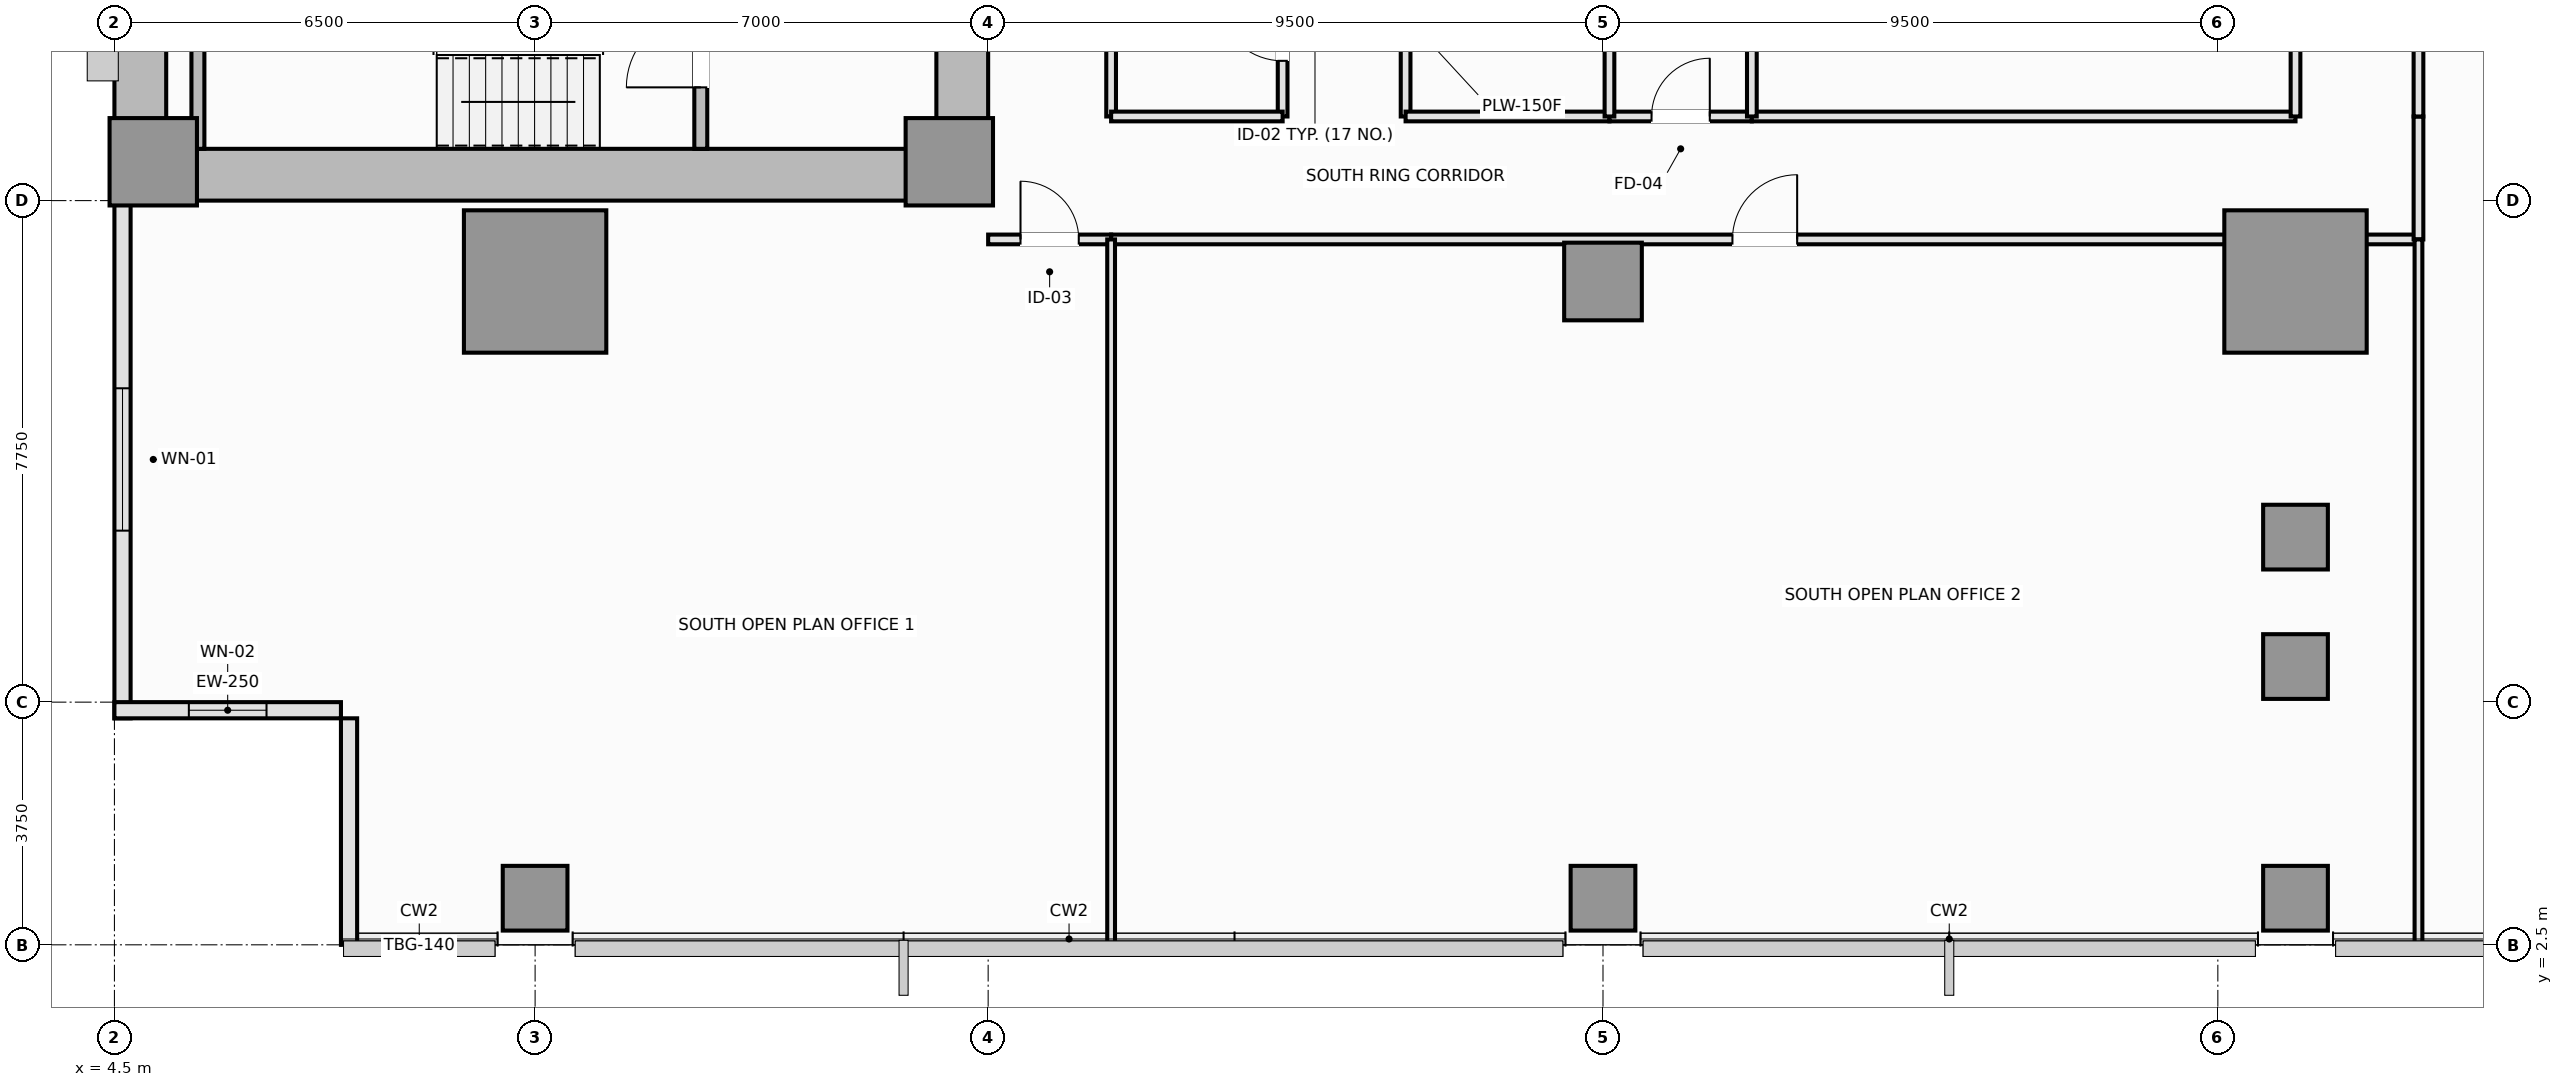
"""IFC4 building model, lengths in metres.
Left out: names, types, materials, properties, quantities, classifications, styles, units other than length and angle.
Written with IfcOpenShell. Run it as: python <this file> out.ifc"""

import sys

from ifc_helpers import new_model, si_unit, direction, frame, frame_2d, origin, origin_2d, place, context, subcontext, project, spatial, rectangle, extrude, element, fill, save


model = new_model("IFC4")
c1 = context("Model", 3, precision=1e-05, world=origin(), true_north=direction((0.0, 1.0)))
c2 = subcontext(c1, "Body", "Model", "MODEL_VIEW")
j1 = project(units=[si_unit("LENGTHUNIT", "METRE"), si_unit("PLANEANGLEUNIT", "RADIAN")], contexts=[c1])
p1 = place(None, origin())
s1 = spatial("IfcSite", under=j1, at=p1, CompositionType="ELEMENT")
p2 = place(p1, origin())
s2 = spatial("IfcBuilding", under=s1, at=p2, CompositionType="ELEMENT")
p3 = place(p2, frame((0.0, 0.0, 46.9)))
s3 = spatial("IfcBuildingStorey", under=s2, at=p3, CompositionType="ELEMENT", Elevation=46.9)
p4 = place(p3, frame((4.5, 14.4, 0.0), z_axis=(0.0, 0.0, 1.0), x_axis=(1.0, 0.0, 0.0)))
e1 = element("IfcWall", 1, at=p4, inside=s3, PredefinedType="SHEAR", context=c2, shape_type="SweptSolid", body=[
    extrude(rectangle(XDim=13.5, YDim=0.8, at=frame_2d((6.75, 0.0))), origin(), (0.0, 0.0, 1.0), 3.55),
])
p5 = place(p3, frame((4.9, 14.8, 0.0), z_axis=(0.0, 0.0, 1.0), x_axis=(0.0, 1.0, 0.0)))
e2 = element("IfcWall", 2, at=p5, inside=s3, PredefinedType="SHEAR", context=c2, shape_type="SweptSolid", body=[
    extrude(rectangle(XDim=20.9, YDim=0.8, at=frame_2d((10.45, 0.0))), origin(), (0.0, 0.0, 1.0), 3.55),
])
p6 = place(p3, frame((17.6, 14.8, 0.0), z_axis=(0.0, 0.0, 1.0), x_axis=(0.0, 1.0, 0.0)))
e3 = element("IfcWall", 3, at=p6, inside=s3, PredefinedType="SHEAR", context=c2, shape_type="SweptSolid", body=[
    extrude(rectangle(XDim=8.65, YDim=0.8, at=frame_2d((4.325, 0.0))), origin(), (0.0, 0.0, 1.0), 3.55),
])
p7 = place(p6, frame((4.1, 0.0, 0.0)))
e4 = element("IfcOpeningElement", 4, at=p7, cuts=e3, PredefinedType="OPENING", context=c2, shape_type="SweptSolid", body=[
    extrude(rectangle(XDim=1.1, YDim=2.15, at=frame_2d((0.55, 1.075))), frame((0.0, 0.41, 0.0), z_axis=(0.0, -1.0, 0.0), x_axis=(1.0, 0.0, 0.0)), (0.0, 0.0, 1.0), 0.82),
])
for number, where, z_axis, x_axis in (
    (5, (5.1, 14.6, 0.0), (0.0, 0.0, 1.0), (1.0, 0.0, 0.0)),
    (6, (17.4, 14.6, 0.0), (0.0, 0.0, 1.0), (1.0, 0.0, 0.0)),
):
    element("IfcColumn", number, at=place(p3, frame(where, z_axis=z_axis, x_axis=x_axis)), inside=s3, PredefinedType="PILASTER", context=c2, shape_type="SweptSolid", body=[
        extrude(rectangle(XDim=1.35, YDim=1.35, at=origin_2d()), origin(), (0.0, 0.0, 1.0), 3.55),
    ])
for number, where, z_axis, x_axis in (
    (7, (11.0, 12.75, 0.0), (0.0, 0.0, 1.0), (1.0, 0.0, 0.0)),
    (8, (38.2, 12.75, 0.0), (0.0, 0.0, 1.0), (1.0, 0.0, 0.0)),
):
    element("IfcColumn", number, at=place(p3, frame(where, z_axis=z_axis, x_axis=x_axis)), inside=s3, PredefinedType="COLUMN", context=c2, shape_type="SweptSolid", body=[
        extrude(rectangle(XDim=2.2, YDim=2.2, at=origin_2d()), origin(), (0.0, 0.0, 1.0), 3.55),
    ])
p8 = place(p3, frame((27.5, 12.75, 0.0), z_axis=(0.0, 0.0, 1.0), x_axis=(1.0, 0.0, 0.0)))
e9 = element("IfcColumn", 9, at=p8, inside=s3, PredefinedType="COLUMN", context=c2, shape_type="SweptSolid", body=[
    extrude(rectangle(XDim=1.2, YDim=1.2, at=origin_2d()), origin(), (0.0, 0.0, 1.0), 3.55),
])
for number, where, z_axis, x_axis in (
    (10, (38.2, 6.8, 0.0), (0.0, 0.0, 1.0), (1.0, 0.0, 0.0)),
    (11, (38.2, 8.8, 0.0), (0.0, 0.0, 1.0), (1.0, 0.0, 0.0)),
    (12, (11.0, 3.22, 0.0), (0.0, 0.0, 1.0), (1.0, 0.0, 0.0)),
    (13, (27.5, 3.22, 0.0), (0.0, 0.0, 1.0), (1.0, 0.0, 0.0)),
    (14, (38.2, 3.22, 0.0), (0.0, 0.0, 1.0), (1.0, 0.0, 0.0)),
):
    element("IfcColumn", number, at=place(p3, frame(where, z_axis=z_axis, x_axis=x_axis)), inside=s3, PredefinedType="COLUMN", context=c2, shape_type="SweptSolid", body=[
        extrude(rectangle(XDim=1.0, YDim=1.0, at=origin_2d()), origin(), (0.0, 0.0, 1.0), 3.55),
    ])
p9 = place(p3, frame((4.625, 14.0, 0.0), z_axis=(0.0, 0.0, 1.0), x_axis=(0.0, -1.0, 0.0)))
e15 = element("IfcWall", 15, at=p9, inside=s3, PredefinedType="SOLIDWALL", context=c2, shape_type="SweptSolid", body=[
    extrude(rectangle(XDim=8.0, YDim=0.25, at=frame_2d((4.0, 0.0))), origin(), (0.0, 0.0, 1.0), 3.37),
])
p10 = place(p9, frame((2.9, 0.0, 0.9)))
e16 = element("IfcOpeningElement", 16, at=p10, cuts=e15, PredefinedType="OPENING", context=c2, shape_type="SweptSolid", body=[
    extrude(rectangle(XDim=2.2, YDim=1.8, at=frame_2d((1.1, 0.9))), frame((0.0, 0.135, 0.0), z_axis=(0.0, -1.0, 0.0), x_axis=(1.0, 0.0, 0.0)), (0.0, 0.0, 1.0), 0.27),
])
p11 = place(p3, frame((4.5, 6.125, 0.0), z_axis=(0.0, 0.0, 1.0), x_axis=(1.0, 0.0, 0.0)))
e17 = element("IfcWall", 17, at=p11, inside=s3, PredefinedType="SOLIDWALL", context=c2, shape_type="SweptSolid", body=[
    extrude(rectangle(XDim=3.5, YDim=0.25, at=frame_2d((1.75, 0.0))), origin(), (0.0, 0.0, 1.0), 3.37),
])
p12 = place(p11, frame((1.15, 0.0, 0.9)))
e18 = element("IfcOpeningElement", 18, at=p12, cuts=e17, PredefinedType="OPENING", context=c2, shape_type="SweptSolid", body=[
    extrude(rectangle(XDim=1.2, YDim=1.8, at=frame_2d((0.6, 0.9))), frame((0.0, 0.135, 0.0), z_axis=(0.0, -1.0, 0.0), x_axis=(1.0, 0.0, 0.0)), (0.0, 0.0, 1.0), 0.27),
])
p13 = place(p3, frame((8.125, 6.0, 0.0), z_axis=(0.0, 0.0, 1.0), x_axis=(0.0, -1.0, 0.0)))
e19 = element("IfcWall", 19, at=p13, inside=s3, PredefinedType="SOLIDWALL", context=c2, shape_type="SweptSolid", body=[
    extrude(rectangle(XDim=3.5, YDim=0.25, at=frame_2d((1.75, 0.0))), origin(), (0.0, 0.0, 1.0), 3.37),
])
p14 = place(p3, frame((5.79, 14.8, 0.0), z_axis=(0.0, 0.0, 1.0), x_axis=(0.0, 1.0, 0.0)))
e20 = element("IfcWall", 20, at=p14, inside=s3, PredefinedType="SOLIDWALL", context=c2, shape_type="SweptSolid", body=[
    extrude(rectangle(XDim=3.05, YDim=0.2, at=frame_2d((1.525, 0.0))), origin(), (0.0, 0.0, 1.0), 3.55),
])
p15 = place(p3, frame((13.56, 14.8, 0.0), z_axis=(0.0, 0.0, 1.0), x_axis=(0.0, 1.0, 0.0)))
e21 = element("IfcWall", 21, at=p15, inside=s3, PredefinedType="SOLIDWALL", context=c2, shape_type="SweptSolid", body=[
    extrude(rectangle(XDim=3.05, YDim=0.2, at=frame_2d((1.525, 0.0))), origin(), (0.0, 0.0, 1.0), 3.55),
])
p16 = place(p15, frame((0.95, 0.0, 0.0)))
e22 = element("IfcOpeningElement", 22, at=p16, cuts=e21, PredefinedType="OPENING", context=c2, shape_type="SweptSolid", body=[
    extrude(rectangle(XDim=1.15, YDim=2.15, at=frame_2d((0.575, 1.075))), frame((0.0, 0.11, 0.0), z_axis=(0.0, -1.0, 0.0), x_axis=(1.0, 0.0, 0.0)), (0.0, 0.0, 1.0), 0.22),
])
p17 = place(p3, frame((22.55, 15.3, 0.0), z_axis=(0.0, 0.0, 1.0), x_axis=(0.0, 1.0, 0.0)))
e23 = element("IfcWall", 23, at=p17, inside=s3, PredefinedType="PARTITIONING", context=c2, shape_type="SweptSolid", body=[
    extrude(rectangle(XDim=2.72, YDim=0.15, at=frame_2d((1.36, 0.0))), origin(), (0.0, 0.0, 1.0), 3.01),
])
p18 = place(p17, frame((0.86, 0.0, 0.0)))
e24 = element("IfcOpeningElement", 24, at=p18, cuts=e23, PredefinedType="OPENING", context=c2, shape_type="SweptSolid", body=[
    extrude(rectangle(XDim=1.0, YDim=2.15, at=frame_2d((0.5, 1.075))), frame((0.0, 0.085, 0.0), z_axis=(0.0, -1.0, 0.0), x_axis=(1.0, 0.0, 0.0)), (0.0, 0.0, 1.0), 0.17),
])
p19 = place(p3, frame((24.45, 15.3, 0.0), z_axis=(0.0, 0.0, 1.0), x_axis=(0.0, 1.0, 0.0)))
e25 = element("IfcWall", 25, at=p19, inside=s3, PredefinedType="PLUMBINGWALL", context=c2, shape_type="SweptSolid", body=[
    extrude(rectangle(XDim=3.1, YDim=0.15, at=frame_2d((1.55, 0.0))), origin(), (0.0, 0.0, 1.0), 3.37),
])
p20 = place(p19, frame((1.1, 0.0, 0.0)))
e26 = element("IfcOpeningElement", 26, at=p20, cuts=e25, PredefinedType="OPENING", context=c2, shape_type="SweptSolid", body=[
    extrude(rectangle(XDim=0.9, YDim=2.1, at=frame_2d((0.45, 1.05))), frame((0.0, 0.085, 0.0), z_axis=(0.0, -1.0, 0.0), x_axis=(1.0, 0.0, 0.0)), (0.0, 0.0, 1.0), 0.17),
])
p21 = place(p3, frame((19.9, 15.3, 0.0), z_axis=(0.0, 0.0, 1.0), x_axis=(0.0, 1.0, 0.0)))
e27 = element("IfcWall", 27, at=p21, inside=s3, PredefinedType="PARTITIONING", context=c2, shape_type="SweptSolid", body=[
    extrude(rectangle(XDim=2.72, YDim=0.15, at=frame_2d((1.36, 0.0))), origin(), (0.0, 0.0, 1.0), 3.37),
])
p22 = place(p3, frame((19.9, 15.3, 0.0), z_axis=(0.0, 0.0, 1.0), x_axis=(1.0, 0.0, 0.0)))
e28 = element("IfcWall", 28, at=p22, inside=s3, PredefinedType="PARTITIONING", context=c2, shape_type="SweptSolid", body=[
    extrude(rectangle(XDim=2.65, YDim=0.15, at=frame_2d((1.325, 0.0))), origin(), (0.0, 0.0, 1.0), 3.37),
])
p23 = place(p3, frame((24.45, 15.3, 0.0), z_axis=(0.0, 0.0, 1.0), x_axis=(1.0, 0.0, 0.0)))
e29 = element("IfcWall", 29, at=p23, inside=s3, PredefinedType="PLUMBINGWALL", context=c2, shape_type="SweptSolid", body=[
    extrude(rectangle(XDim=3.15, YDim=0.15, at=frame_2d((1.575, 0.0))), origin(), (0.0, 0.0, 1.0), 3.37),
])
p24 = place(p3, frame((27.6, 15.3, 0.0), z_axis=(0.0, 0.0, 1.0), x_axis=(1.0, 0.0, 0.0)))
e30 = element("IfcWall", 30, at=p24, inside=s3, PredefinedType="PLUMBINGWALL", context=c2, shape_type="SweptSolid", body=[
    extrude(rectangle(XDim=2.2, YDim=0.15, at=frame_2d((1.1, 0.0))), origin(), (0.0, 0.0, 1.0), 3.37),
])
p25 = place(p24, frame((0.65, 0.0, 0.0)))
e31 = element("IfcOpeningElement", 31, at=p25, cuts=e30, PredefinedType="OPENING", context=c2, shape_type="SweptSolid", body=[
    extrude(rectangle(XDim=0.9, YDim=2.1, at=frame_2d((0.45, 1.05))), frame((0.0, 0.085, 0.0), z_axis=(0.0, -1.0, 0.0), x_axis=(1.0, 0.0, 0.0)), (0.0, 0.0, 1.0), 0.17),
])
p26 = place(p3, frame((29.8, 15.3, 0.0), z_axis=(0.0, 0.0, 1.0), x_axis=(1.0, 0.0, 0.0)))
e32 = element("IfcWall", 32, at=p26, inside=s3, PredefinedType="PARTITIONING", context=c2, shape_type="SweptSolid", body=[
    extrude(rectangle(XDim=8.4, YDim=0.15, at=frame_2d((4.2, 0.0))), origin(), (0.0, 0.0, 1.0), 3.37),
])
p27 = place(p3, frame((18.0, 13.4, 0.0), z_axis=(0.0, 0.0, 1.0), x_axis=(1.0, 0.0, 0.0)))
e33 = element("IfcWall", 33, at=p27, inside=s3, PredefinedType="PARTITIONING", context=c2, shape_type="SweptSolid", body=[
    extrude(rectangle(XDim=1.9, YDim=0.15, at=frame_2d((0.95, 0.0))), origin(), (0.0, 0.0, 1.0), 3.37),
])
p28 = place(p27, frame((0.5, 0.0, 0.0)))
e34 = element("IfcOpeningElement", 34, at=p28, cuts=e33, PredefinedType="OPENING", context=c2, shape_type="SweptSolid", body=[
    extrude(rectangle(XDim=0.9, YDim=2.1, at=frame_2d((0.45, 1.05))), frame((0.0, 0.085, 0.0), z_axis=(0.0, -1.0, 0.0), x_axis=(1.0, 0.0, 0.0)), (0.0, 0.0, 1.0), 0.17),
])
p29 = place(p3, frame((19.9, 13.4, 0.0), z_axis=(0.0, 0.0, 1.0), x_axis=(1.0, 0.0, 0.0)))
e35 = element("IfcWall", 35, at=p29, inside=s3, PredefinedType="PARTITIONING", context=c2, shape_type="SweptSolid", body=[
    extrude(rectangle(XDim=20.2, YDim=0.15, at=frame_2d((10.1, 0.0))), origin(), (0.0, 0.0, 1.0), 3.37),
])
p30 = place(p29, frame((9.6, 0.0, 0.0)))
e36 = element("IfcOpeningElement", 36, at=p30, cuts=e35, PredefinedType="OPENING", context=c2, shape_type="SweptSolid", body=[
    extrude(rectangle(XDim=1.0, YDim=2.15, at=frame_2d((0.5, 1.075))), frame((0.0, 0.085, 0.0), z_axis=(0.0, -1.0, 0.0), x_axis=(1.0, 0.0, 0.0)), (0.0, 0.0, 1.0), 0.17),
])
p31 = place(p3, frame((40.1, 13.4, 0.0), z_axis=(0.0, 0.0, 1.0), x_axis=(0.0, 1.0, 0.0)))
e37 = element("IfcWall", 37, at=p31, inside=s3, PredefinedType="PARTITIONING", context=c2, shape_type="SweptSolid", body=[
    extrude(rectangle(XDim=1.9, YDim=0.15, at=frame_2d((0.95, 0.0))), origin(), (0.0, 0.0, 1.0), 3.37),
])
p32 = place(p3, frame((38.2, 15.3, 0.0), z_axis=(0.0, 0.0, 1.0), x_axis=(0.0, 1.0, 0.0)))
e38 = element("IfcWall", 38, at=p32, inside=s3, PredefinedType="PARTITIONING", context=c2, shape_type="SweptSolid", body=[
    extrude(rectangle(XDim=3.1, YDim=0.15, at=frame_2d((1.55, 0.0))), origin(), (0.0, 0.0, 1.0), 2.82),
])
p33 = place(p32, frame((1.05, 0.0, 0.0)))
e39 = element("IfcOpeningElement", 39, at=p33, cuts=e38, PredefinedType="OPENING", context=c2, shape_type="SweptSolid", body=[
    extrude(rectangle(XDim=1.0, YDim=2.15, at=frame_2d((0.5, 1.075))), frame((0.0, 0.085, 0.0), z_axis=(0.0, -1.0, 0.0), x_axis=(1.0, 0.0, 0.0)), (0.0, 0.0, 1.0), 0.17),
])
p34 = place(p3, frame((40.1, 15.3, 0.0), z_axis=(0.0, 0.0, 1.0), x_axis=(0.0, 1.0, 0.0)))
e40 = element("IfcWall", 40, at=p34, inside=s3, PredefinedType="PARTITIONING", context=c2, shape_type="SweptSolid", body=[
    extrude(rectangle(XDim=3.2, YDim=0.15, at=frame_2d((1.6, 0.0))), origin(), (0.0, 0.0, 1.0), 3.37),
])
p35 = place(p34, frame((1.1, 0.0, 0.0)))
e41 = element("IfcOpeningElement", 41, at=p35, cuts=e40, PredefinedType="OPENING", context=c2, shape_type="SweptSolid", body=[
    extrude(rectangle(XDim=1.0, YDim=2.15, at=frame_2d((0.5, 1.075))), frame((0.0, 0.085, 0.0), z_axis=(0.0, -1.0, 0.0), x_axis=(1.0, 0.0, 0.0)), (0.0, 0.0, 1.0), 0.17),
])
for number, where, z_axis, x_axis in (
    (42, (27.6, 15.3, 0.0), (0.0, 0.0, 1.0), (0.0, 1.0, 0.0)),
    (43, (29.8, 15.3, 0.0), (0.0, 0.0, 1.0), (0.0, 1.0, 0.0)),
):
    element("IfcWall", number, at=place(p3, frame(where, z_axis=z_axis, x_axis=x_axis)), inside=s3, PredefinedType="PLUMBINGWALL", context=c2, shape_type="SweptSolid", body=[
        extrude(rectangle(XDim=3.1, YDim=0.15, at=frame_2d((1.55, 0.0))), origin(), (0.0, 0.0, 1.0), 3.37),
    ])
for number, where, z_axis, x_axis in (
    (44, (19.9, 2.51, 0.0), (0.0, 0.0, 1.0), (0.0, 1.0, 0.0)),
    (45, (40.1, 2.51, 0.0), (0.0, 0.0, 1.0), (0.0, 1.0, 0.0)),
):
    element("IfcWall", number, at=place(p3, frame(where, z_axis=z_axis, x_axis=x_axis)), inside=s3, PredefinedType="PARTITIONING", context=c2, shape_type="SweptSolid", body=[
        extrude(rectangle(XDim=10.89, YDim=0.12, at=frame_2d((5.445, 0.0))), origin(), (0.0, 0.0, 1.0), 3.37),
    ])
p36 = place(p10, origin())
e46 = element("IfcWindow", 46, at=p36, inside=s3, PartitioningType="SINGLE_PANEL", PredefinedType="WINDOW", context=c2, shape_type="SweptSolid", body=[
    extrude(rectangle(XDim=2.2, YDim=1.8, at=frame_2d((1.1, 0.9))), frame((0.0, 0.03, 0.0), z_axis=(0.0, -1.0, 0.0), x_axis=(1.0, 0.0, 0.0)), (0.0, 0.0, 1.0), 0.06),
])
fill(e16, e46)
p37 = place(p12, origin())
e47 = element("IfcWindow", 47, at=p37, inside=s3, PartitioningType="SINGLE_PANEL", PredefinedType="WINDOW", context=c2, shape_type="SweptSolid", body=[
    extrude(rectangle(XDim=1.2, YDim=1.8, at=frame_2d((0.6, 0.9))), frame((0.0, 0.03, 0.0), z_axis=(0.0, -1.0, 0.0), x_axis=(1.0, 0.0, 0.0)), (0.0, 0.0, 1.0), 0.06),
])
fill(e18, e47)
p38 = place(p16, origin())
e48 = element("IfcDoor", 48, at=p38, inside=s3, OperationType="SINGLE_SWING_LEFT", PredefinedType="DOOR", context=c2, shape_type="SweptSolid", body=[
    extrude(rectangle(XDim=1.15, YDim=2.15, at=frame_2d((0.575, 1.075))), frame((0.0, 0.025, 0.0), z_axis=(0.0, -1.0, 0.0), x_axis=(1.0, 0.0, 0.0)), (0.0, 0.0, 1.0), 0.05),
])
fill(e22, e48)
p39 = place(p18, origin())
e49 = element("IfcDoor", 49, at=p39, inside=s3, OperationType="SINGLE_SWING_RIGHT", PredefinedType="DOOR", context=c2, shape_type="SweptSolid", body=[
    extrude(rectangle(XDim=1.0, YDim=2.15, at=frame_2d((0.5, 1.075))), frame((0.0, 0.025, 0.0), z_axis=(0.0, -1.0, 0.0), x_axis=(1.0, 0.0, 0.0)), (0.0, 0.0, 1.0), 0.05),
])
fill(e24, e49)
p40 = place(p25, origin())
e50 = element("IfcDoor", 50, at=p40, inside=s3, OperationType="SINGLE_SWING_RIGHT", PredefinedType="DOOR", context=c2, shape_type="SweptSolid", body=[
    extrude(rectangle(XDim=0.9, YDim=2.1, at=frame_2d((0.45, 1.05))), frame((0.0, 0.025, 0.0), z_axis=(0.0, -1.0, 0.0), x_axis=(1.0, 0.0, 0.0)), (0.0, 0.0, 1.0), 0.05),
])
fill(e31, e50)
p41 = place(p28, origin())
e51 = element("IfcDoor", 51, at=p41, inside=s3, OperationType="SINGLE_SWING_LEFT", PredefinedType="DOOR", context=c2, shape_type="SweptSolid", body=[
    extrude(rectangle(XDim=0.9, YDim=2.1, at=frame_2d((0.45, 1.05))), frame((0.0, 0.025, 0.0), z_axis=(0.0, -1.0, 0.0), x_axis=(1.0, 0.0, 0.0)), (0.0, 0.0, 1.0), 0.05),
])
fill(e34, e51)
p42 = place(p30, origin())
e52 = element("IfcDoor", 52, at=p42, inside=s3, OperationType="SINGLE_SWING_RIGHT", PredefinedType="DOOR", context=c2, shape_type="SweptSolid", body=[
    extrude(rectangle(XDim=1.0, YDim=2.15, at=frame_2d((0.5, 1.075))), frame((0.0, 0.025, 0.0), z_axis=(0.0, -1.0, 0.0), x_axis=(1.0, 0.0, 0.0)), (0.0, 0.0, 1.0), 0.05),
])
fill(e36, e52)
save(model, sys.argv[1])
